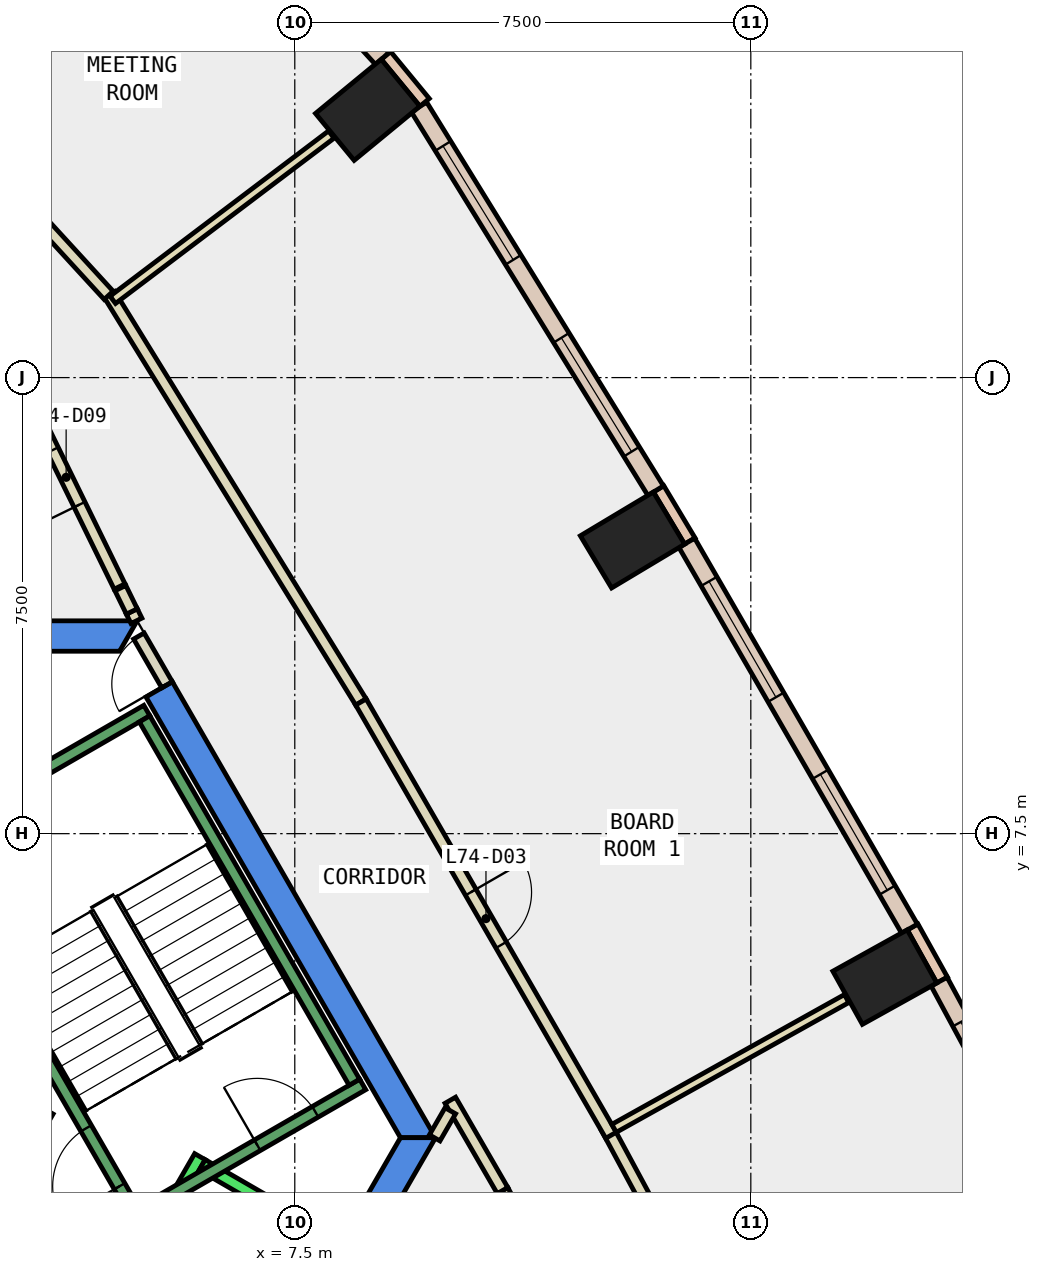
"""IFC4 building model, lengths in metres.
Left out: names, types, materials, properties, quantities, classifications, styles, units other than length and angle.
Written with IfcOpenShell. Run it as: python <this file> out.ifc"""

import sys

from ifc_helpers import new_model, si_unit, direction, frame, frame_2d, origin, origin_2d, place, context, subcontext, project, spatial, polyline, rectangle, outline, extrude, element, fill, save


model = new_model("IFC4")
c1 = context("Model", 3, precision=1e-05, world=origin(), true_north=direction((0.0, 1.0)))
c2 = subcontext(c1, "Body", "Model", "MODEL_VIEW")
j1 = project(units=[si_unit("LENGTHUNIT", "METRE"), si_unit("PLANEANGLEUNIT", "RADIAN")], contexts=[c1])
p1 = place(None, origin())
s1 = spatial("IfcSite", under=j1, at=p1, CompositionType="ELEMENT")
p2 = place(p1, origin())
s2 = spatial("IfcBuilding", under=s1, at=p2, CompositionType="ELEMENT")
p3 = place(p2, frame((0.0, 0.0, 315.2)))
s3 = spatial("IfcBuildingStorey", under=s2, at=p3, CompositionType="ELEMENT", Elevation=315.2)
for number, where, z_axis, x_axis in (
    (1, (17.204, 5.141, -0.34), (0.0, 0.0, 1.0), (-0.486, 0.874, 0.0)),
    (2, (13.054, 12.329, -0.34), (0.0, 0.0, 1.0), (-0.514, 0.858, 0.0)),
    (3, (8.699, 19.403, -0.34), (0.0, 0.0, 1.0), (-0.636, 0.772, 0.0)),
):
    element("IfcColumn", number, at=place(p3, frame(where, z_axis=z_axis, x_axis=x_axis)), inside=s3, PredefinedType="COLUMN", context=c2, shape_type="SweptSolid", body=[
        extrude(rectangle(XDim=1.0, YDim=1.4, at=origin_2d()), origin(), (0.0, 0.0, 1.0), 3.6),
    ])
p4 = place(p3, frame((0.0, 0.0, -0.34)))
e4 = element("IfcWall", 4, at=p4, inside=s3, PredefinedType="SHEAR", context=c2, shape_type="SweptSolid", body=[
    extrude(outline(polyline([(5.486, 9.998), (5.053, 9.748), (9.238, 2.5), (9.815, 2.5), (5.486, 9.998)])), origin(), (0.0, 0.0, 1.0), 3.6),
])
p5 = place(p3, frame((0.0, 0.0, -0.34)))
e5 = element("IfcWall", 5, at=p5, inside=s3, PredefinedType="SHEAR", context=c2, shape_type="SweptSolid", body=[
    extrude(outline(polyline([(4.907, 11.0), (-4.907, 11.0), (-4.619, 10.5), (4.619, 10.5), (4.907, 11.0)])), origin(), (0.0, 0.0, 1.0), 3.6),
])
p6 = place(p3, frame((0.0, 0.0, -0.34)))
e6 = element("IfcWall", 6, at=p6, inside=s3, PredefinedType="SHEAR", context=c2, shape_type="SweptSolid", body=[
    extrude(outline(polyline([(4.907, -6.0), (9.815, 2.5), (9.238, 2.5), (4.619, -5.5), (4.907, -6.0)])), origin(), (0.0, 0.0, 1.0), 3.6),
])
p7 = place(p3, frame((18.147, 5.092, 0.0), z_axis=(0.0, 0.0, 1.0), x_axis=(-0.486036693078, 0.873938403425, 0.0)))
e7 = element("IfcWall", 7, at=p7, inside=s3, PredefinedType="STANDARD", context=c2, shape_type="SweptSolid", body=[
    extrude(rectangle(XDim=1.0, YDim=0.2, at=frame_2d((0.5, 0.0))), origin(), (0.0, 0.0, 1.0), 3.26),
])
p8 = place(p3, frame((13.997, 12.312, 0.0), z_axis=(0.0, 0.0, 1.0), x_axis=(-0.514064933905, 0.857751271482, 0.0)))
e8 = element("IfcWall", 8, at=p8, inside=s3, PredefinedType="STANDARD", context=c2, shape_type="SweptSolid", body=[
    extrude(rectangle(XDim=1.0, YDim=0.2, at=frame_2d((0.5, 0.0))), origin(), (0.0, 0.0, 1.0), 3.26),
])
p9 = place(p3, frame((9.635, 19.525, 0.0), z_axis=(0.0, 0.0, 1.0), x_axis=(-0.6357329148, 0.77190910154, 0.0)))
e9 = element("IfcWall", 9, at=p9, inside=s3, PredefinedType="STANDARD", context=c2, shape_type="SweptSolid", body=[
    extrude(rectangle(XDim=1.0, YDim=0.2, at=frame_2d((0.5, 0.0))), origin(), (0.0, 0.0, 1.0), 3.26),
])
p10 = place(p3, frame((21.615, -1.462, 0.0), z_axis=(0.0, 0.0, 1.0), x_axis=(-0.474421773145, 0.880297666228, 0.0)))
e10 = element("IfcWall", 10, at=p10, inside=s3, PredefinedType="STANDARD", context=c2, shape_type="SweptSolid", body=[
    extrude(rectangle(XDim=7.416, YDim=0.3, at=frame_2d((3.708, 0.0))), origin(), (0.0, 0.0, 1.0), 3.26),
])
p11 = place(p10, frame((0.754, 0.0, 0.9)))
e11 = element("IfcOpeningElement", 11, at=p11, cuts=e10, PredefinedType="OPENING", context=c2, shape_type="SweptSolid", body=[
    extrude(rectangle(XDim=2.2, YDim=2.0, at=frame_2d((1.1, 1.0))), frame((0.0, 0.16, 0.0), z_axis=(0.0, -1.0, 0.0), x_axis=(1.0, 0.0, 0.0)), (0.0, 0.0, 1.0), 0.32),
])
p12 = place(p10, frame((4.462, 0.0, 0.9)))
e12 = element("IfcOpeningElement", 12, at=p12, cuts=e10, PredefinedType="OPENING", context=c2, shape_type="SweptSolid", body=[
    extrude(rectangle(XDim=2.2, YDim=2.0, at=frame_2d((1.1, 1.0))), frame((0.0, 0.16, 0.0), z_axis=(0.0, -1.0, 0.0), x_axis=(1.0, 0.0, 0.0)), (0.0, 0.0, 1.0), 0.32),
])
p13 = place(p3, frame((17.61, 5.937, 0.0), z_axis=(0.0, 0.0, 1.0), x_axis=(-0.499923391538, 0.866069629183, 0.0)))
e13 = element("IfcWall", 13, at=p13, inside=s3, PredefinedType="STANDARD", context=c2, shape_type="SweptSolid", body=[
    extrude(rectangle(XDim=7.327, YDim=0.3, at=frame_2d((3.664, 0.0))), origin(), (0.0, 0.0, 1.0), 3.26),
])
p14 = place(p13, frame((0.732, 0.0, 0.9)))
e14 = element("IfcOpeningElement", 14, at=p14, cuts=e13, PredefinedType="OPENING", context=c2, shape_type="SweptSolid", body=[
    extrude(rectangle(XDim=2.2, YDim=2.0, at=frame_2d((1.1, 1.0))), frame((0.0, 0.16, 0.0), z_axis=(0.0, -1.0, 0.0), x_axis=(1.0, 0.0, 0.0)), (0.0, 0.0, 1.0), 0.32),
])
p15 = place(p13, frame((4.395, 0.0, 0.9)))
e15 = element("IfcOpeningElement", 15, at=p15, cuts=e13, PredefinedType="OPENING", context=c2, shape_type="SweptSolid", body=[
    extrude(rectangle(XDim=2.2, YDim=2.0, at=frame_2d((1.1, 1.0))), frame((0.0, 0.16, 0.0), z_axis=(0.0, -1.0, 0.0), x_axis=(1.0, 0.0, 0.0)), (0.0, 0.0, 1.0), 0.32),
])
p16 = place(p3, frame((13.435, 13.14, 0.0), z_axis=(0.0, 0.0, 1.0), x_axis=(-0.525070792614, 0.851058554239, 0.0)))
e16 = element("IfcWall", 16, at=p16, inside=s3, PredefinedType="STANDARD", context=c2, shape_type="SweptSolid", body=[
    extrude(rectangle(XDim=7.414, YDim=0.3, at=frame_2d((3.707, 0.0))), origin(), (0.0, 0.0, 1.0), 3.26),
])
p17 = place(p16, frame((0.754, 0.0, 0.9)))
e17 = element("IfcOpeningElement", 17, at=p17, cuts=e16, PredefinedType="OPENING", context=c2, shape_type="SweptSolid", body=[
    extrude(rectangle(XDim=2.2, YDim=2.0, at=frame_2d((1.1, 1.0))), frame((0.0, 0.16, 0.0), z_axis=(0.0, -1.0, 0.0), x_axis=(1.0, 0.0, 0.0)), (0.0, 0.0, 1.0), 0.32),
])
p18 = place(p16, frame((4.461, 0.0, 0.9)))
e18 = element("IfcOpeningElement", 18, at=p18, cuts=e16, PredefinedType="OPENING", context=c2, shape_type="SweptSolid", body=[
    extrude(rectangle(XDim=2.2, YDim=2.0, at=frame_2d((1.1, 1.0))), frame((0.0, 0.16, 0.0), z_axis=(0.0, -1.0, 0.0), x_axis=(1.0, 0.0, 0.0)), (0.0, 0.0, 1.0), 0.32),
])
p19 = place(p3, frame((8.94, 20.248, 0.0), z_axis=(0.0, 0.0, 1.0), x_axis=(-0.675798306171, 0.737086595575, 0.0)))
e19 = element("IfcWall", 19, at=p19, inside=s3, PredefinedType="STANDARD", context=c2, shape_type="SweptSolid", body=[
    extrude(rectangle(XDim=4.501, YDim=0.3, at=frame_2d((2.25, 0.0))), origin(), (0.0, 0.0, 1.0), 3.26),
])
p20 = place(p19, frame((1.551, 0.0, 0.9)))
e20 = element("IfcOpeningElement", 20, at=p20, cuts=e19, PredefinedType="OPENING", context=c2, shape_type="SweptSolid", body=[
    extrude(rectangle(XDim=1.4, YDim=2.0, at=frame_2d((0.7, 1.0))), frame((0.0, 0.16, 0.0), z_axis=(0.0, -1.0, 0.0), x_axis=(1.0, 0.0, 0.0)), (0.0, 0.0, 1.0), 0.32),
])
p21 = place(p3, frame((4.896, 11.0, 0.0), z_axis=(0.0, 0.0, 1.0), x_axis=(-0.44208884847, 0.896971264901, 0.0)))
e21 = element("IfcWall", 21, at=p21, inside=s3, PredefinedType="PARTITIONING", context=c2, shape_type="SweptSolid", body=[
    extrude(rectangle(XDim=0.172, YDim=0.2, at=frame_2d((0.086, 0.0))), origin(), (0.0, 0.0, 1.0), 2.4),
])
p22 = place(p3, frame((4.619, 11.564, 0.0), z_axis=(0.0, 0.0, 1.0), x_axis=(-0.439654479941, 0.898166987964, 0.0)))
e22 = element("IfcWall", 22, at=p22, inside=s3, PredefinedType="PARTITIONING", context=c2, shape_type="SweptSolid", body=[
    extrude(rectangle(XDim=4.0, YDim=0.2, at=frame_2d((2.0, 0.0))), origin(), (0.0, 0.0, 1.0), 3.26),
])
p23 = place(p22, frame((1.5, 0.0, 0.0)))
e23 = element("IfcOpeningElement", 23, at=p23, cuts=e22, PredefinedType="OPENING", context=c2, shape_type="SweptSolid", body=[
    extrude(rectangle(XDim=1.0, YDim=2.1, at=frame_2d((0.5, 1.05))), frame((0.0, 0.11, 0.0), z_axis=(0.0, -1.0, 0.0), x_axis=(1.0, 0.0, 0.0)), (0.0, 0.0, 1.0), 0.22),
])
p24 = place(p3, frame((14.549, -5.107, 0.0), z_axis=(0.0, 0.0, 1.0), x_axis=(-0.47449538478, 0.880257990491, 0.0)))
e24 = element("IfcWall", 24, at=p24, inside=s3, PredefinedType="PARTITIONING", context=c2, shape_type="SweptSolid", body=[
    extrude(rectangle(XDim=7.655, YDim=0.2, at=frame_2d((3.827, 0.0))), origin(), (0.0, 0.0, 1.0), 3.26),
])
p25 = place(p24, frame((2.927, 0.0, 0.0)))
e25 = element("IfcOpeningElement", 25, at=p25, cuts=e24, PredefinedType="OPENING", context=c2, shape_type="SweptSolid", body=[
    extrude(rectangle(XDim=1.8, YDim=2.1, at=frame_2d((0.9, 1.05))), frame((0.0, 0.11, 0.0), z_axis=(0.0, -1.0, 0.0), x_axis=(1.0, 0.0, 0.0)), (0.0, 0.0, 1.0), 0.22),
])
p26 = place(p3, frame((10.917, 1.631, 0.0), z_axis=(0.0, 0.0, 1.0), x_axis=(-0.500699613169, 0.865621104972, 0.0)))
e26 = element("IfcWall", 26, at=p26, inside=s3, PredefinedType="PARTITIONING", context=c2, shape_type="SweptSolid", body=[
    extrude(rectangle(XDim=1.715, YDim=0.2, at=frame_2d((0.858, 0.0))), origin(), (0.0, 0.0, 1.0), 3.26),
])
p27 = place(p3, frame((10.058, 2.943, 0.0), z_axis=(0.0, 0.0, 1.0), x_axis=(-0.499352927503, -0.866398669086, 0.0)))
e27 = element("IfcWall", 27, at=p27, inside=s3, PredefinedType="PARTITIONING", context=c2, shape_type="SweptSolid", body=[
    extrude(rectangle(XDim=0.515, YDim=0.2, at=frame_2d((0.257, 0.0))), origin(), (0.0, 0.0, 1.0), 3.26),
])
p28 = place(p3, frame((12.628, 2.671, 0.0), z_axis=(0.0, 0.0, 1.0), x_axis=(0.474489967676, -0.880260910512, 0.0)))
e28 = element("IfcWall", 28, at=p28, inside=s3, PredefinedType="PARTITIONING", context=c2, shape_type="SweptSolid", body=[
    extrude(rectangle(XDim=7.948, YDim=0.2, at=frame_2d((3.974, 0.0))), origin(), (0.0, 0.0, 1.0), 3.26),
])
p29 = place(p28, frame((3.474, 0.0, 0.0)))
e29 = element("IfcOpeningElement", 29, at=p29, cuts=e28, PredefinedType="OPENING", context=c2, shape_type="SweptSolid", body=[
    extrude(rectangle(XDim=1.0, YDim=2.1, at=frame_2d((0.5, 1.05))), frame((0.0, 0.11, 0.0), z_axis=(0.0, -1.0, 0.0), x_axis=(1.0, 0.0, 0.0)), (0.0, 0.0, 1.0), 0.22),
])
p30 = place(p3, frame((4.454, 16.364, 0.0), z_axis=(0.0, 0.0, 1.0), x_axis=(0.525142215688, -0.851014484778, 0.0)))
e30 = element("IfcWall", 30, at=p30, inside=s3, PredefinedType="PARTITIONING", context=c2, shape_type="SweptSolid", body=[
    extrude(rectangle(XDim=7.872, YDim=0.2, at=frame_2d((3.936, 0.0))), origin(), (0.0, 0.0, 1.0), 3.26),
])
p31 = place(p3, frame((8.588, 9.665, 0.0), z_axis=(0.0, 0.0, 1.0), x_axis=(0.499946799636, -0.86605611685, 0.0)))
e31 = element("IfcWall", 31, at=p31, inside=s3, PredefinedType="PARTITIONING", context=c2, shape_type="SweptSolid", body=[
    extrude(rectangle(XDim=8.227, YDim=0.2, at=frame_2d((4.114, 0.0))), origin(), (0.0, 0.0, 1.0), 3.26),
])
p32 = place(p31, frame((3.613, 0.0, 0.0)))
e32 = element("IfcOpeningElement", 32, at=p32, cuts=e31, PredefinedType="OPENING", context=c2, shape_type="SweptSolid", body=[
    extrude(rectangle(XDim=1.0, YDim=2.1, at=frame_2d((0.5, 1.05))), frame((0.0, 0.11, 0.0), z_axis=(0.0, -1.0, 0.0), x_axis=(1.0, 0.0, 0.0)), (0.0, 0.0, 1.0), 0.22),
])
p33 = place(p3, frame((2.204, 18.791, 0.0), z_axis=(0.0, 0.0, 1.0), x_axis=(0.675731313907, -0.737148011871, 0.0)))
e33 = element("IfcWall", 33, at=p33, inside=s3, PredefinedType="PARTITIONING", context=c2, shape_type="SweptSolid", body=[
    extrude(rectangle(XDim=3.307, YDim=0.2, at=frame_2d((1.654, 0.0))), origin(), (0.0, 0.0, 1.0), 3.26),
])
p34 = place(p3, frame((1.866, 3.732, 0.0), z_axis=(0.0, 0.0, 1.0), x_axis=(0.866043361281, -0.499968895414, 0.0)))
e34 = element("IfcWall", 34, at=p34, inside=s3, PredefinedType="PARTITIONING", context=c2, shape_type="SweptSolid", body=[
    extrude(rectangle(XDim=1.858, YDim=0.2, at=frame_2d((0.929, 0.0))), origin(), (0.0, 0.0, 1.0), 3.26),
])
p35 = place(p34, frame((0.379, 0.0, 0.0)))
e35 = element("IfcOpeningElement", 35, at=p35, cuts=e34, PredefinedType="OPENING", context=c2, shape_type="SweptSolid", body=[
    extrude(rectangle(XDim=1.0, YDim=2.1, at=frame_2d((0.5, 1.05))), frame((0.0, 0.11, 0.0), z_axis=(0.0, -1.0, 0.0), x_axis=(1.0, 0.0, 0.0)), (0.0, 0.0, 1.0), 0.22),
])
p36 = place(p3, frame((12.751, 2.654, 0.0), z_axis=(0.0, 0.0, 1.0), x_axis=(0.873277679945, 0.487222837837, 0.0)))
e36 = element("IfcWall", 36, at=p36, inside=s3, PredefinedType="PARTITIONING", context=c2, shape_type="SweptSolid", body=[
    extrude(rectangle(XDim=4.38, YDim=0.15, at=frame_2d((2.19, 0.0))), origin(), (0.0, 0.0, 1.0), 3.26),
])
p37 = place(p3, frame((4.507, 16.279, 0.0), z_axis=(0.0, 0.0, 1.0), x_axis=(0.797594482062, 0.603194033611, 0.0)))
e37 = element("IfcWall", 37, at=p37, inside=s3, PredefinedType="PARTITIONING", context=c2, shape_type="SweptSolid", body=[
    extrude(rectangle(XDim=4.506, YDim=0.15, at=frame_2d((2.253, 0.0))), origin(), (0.0, 0.0, 1.0), 3.26),
])
p38 = place(p3, frame((5.399, 9.948, 0.0), z_axis=(0.0, 0.0, 1.0), x_axis=(-0.499882215713, 0.866093395895, 0.0)))
e38 = element("IfcWall", 38, at=p38, inside=s3, PredefinedType="PARTITIONING", context=c2, shape_type="SweptSolid", body=[
    extrude(rectangle(XDim=0.926, YDim=0.2, at=frame_2d((0.463, 0.0))), origin(), (0.0, 0.0, 1.0), 2.4),
])
p39 = place(p38, frame((0.017, 0.0, 0.0)))
e39 = element("IfcOpeningElement", 39, at=p39, cuts=e38, PredefinedType="OPENING", context=c2, shape_type="SweptSolid", body=[
    extrude(rectangle(XDim=0.9, YDim=2.1, at=frame_2d((0.45, 1.05))), frame((0.0, 0.11, 0.0), z_axis=(0.0, -1.0, 0.0), x_axis=(1.0, 0.0, 0.0)), (0.0, 0.0, 1.0), 0.22),
])
p40 = place(p3, frame((4.82, 11.154, 0.0), z_axis=(0.0, 0.0, 1.0), x_axis=(-0.439660677009, 0.898163954461, 0.0)))
e40 = element("IfcWall", 40, at=p40, inside=s3, PredefinedType="PARTITIONING", context=c2, shape_type="SweptSolid", body=[
    extrude(rectangle(XDim=0.427, YDim=0.2, at=frame_2d((0.214, 0.0))), origin(), (0.0, 0.0, 1.0), 3.26),
])
p41 = place(p3, frame((3.24, -2.488, 0.0), z_axis=(0.0, 0.0, 1.0), x_axis=(0.500034260056, 0.866005622828, 0.0)))
e41 = element("IfcWall", 41, at=p41, inside=s3, PredefinedType="STANDARD", context=c2, shape_type="SweptSolid", body=[
    extrude(rectangle(XDim=5.399, YDim=0.2, at=frame_2d((2.7, 0.0))), origin(), (0.0, 0.0, 1.0), 3.26),
])
p42 = place(p41, frame((3.225, 0.0, 0.0)))
e42 = element("IfcOpeningElement", 42, at=p42, cuts=e41, PredefinedType="OPENING", context=c2, shape_type="SweptSolid", body=[
    extrude(rectangle(XDim=1.1, YDim=2.1, at=frame_2d((0.55, 1.05))), frame((0.0, 0.11, 0.0), z_axis=(0.0, -1.0, 0.0), x_axis=(1.0, 0.0, 0.0)), (0.0, 0.0, 1.0), 0.22),
])
p43 = place(p41, frame((1.225, 0.0, 0.0)))
e43 = element("IfcOpeningElement", 43, at=p43, cuts=e41, PredefinedType="OPENING", context=c2, shape_type="SweptSolid", body=[
    extrude(rectangle(XDim=1.1, YDim=2.1, at=frame_2d((0.55, 1.05))), frame((0.0, 0.11, 0.0), z_axis=(0.0, -1.0, 0.0), x_axis=(1.0, 0.0, 0.0)), (0.0, 0.0, 1.0), 0.22),
])
p44 = place(p3, frame((5.977, 2.052, 0.0), z_axis=(0.0, 0.0, 1.0), x_axis=(0.865973769406, -0.500089422704, 0.0)))
e44 = element("IfcWall", 44, at=p44, inside=s3, PredefinedType="STANDARD", context=c2, shape_type="SweptSolid", body=[
    extrude(rectangle(XDim=2.399, YDim=0.2, at=frame_2d((1.2, 0.0))), origin(), (0.0, 0.0, 1.0), 3.26),
])
p45 = place(p3, frame((4.806, 1.176, 0.0), z_axis=(0.0, 0.0, 1.0), x_axis=(0.866059941101, 0.499940174841, 0.0)))
e45 = element("IfcWall", 45, at=p45, inside=s3, PredefinedType="STANDARD", context=c2, shape_type="SweptSolid", body=[
    extrude(rectangle(XDim=4.4, YDim=0.2, at=frame_2d((2.2, 0.0))), origin(), (0.0, 0.0, 1.0), 3.26),
])
p46 = place(p45, frame((2.4, 0.0, 0.0)))
e46 = element("IfcOpeningElement", 46, at=p46, cuts=e45, PredefinedType="OPENING", context=c2, shape_type="SweptSolid", body=[
    extrude(rectangle(XDim=1.1, YDim=2.2, at=frame_2d((0.55, 1.1))), frame((0.0, 0.11, 0.0), z_axis=(0.0, -1.0, 0.0), x_axis=(1.0, 0.0, 0.0)), (0.0, 0.0, 1.0), 0.22),
])
p47 = place(p3, frame((2.7, 8.158, 0.0), z_axis=(0.0, 0.0, 1.0), x_axis=(0.86611865017, 0.499838457731, 0.0)))
e47 = element("IfcWall", 47, at=p47, inside=s3, PredefinedType="STANDARD", context=c2, shape_type="SweptSolid", body=[
    extrude(rectangle(XDim=2.733, YDim=0.2, at=frame_2d((1.366, 0.0))), origin(), (0.0, 0.0, 1.0), 3.26),
])
p48 = place(p3, frame((4.843, 1.312, 0.0), z_axis=(0.0, 0.0, 1.0), x_axis=(-0.499963383562, 0.866046543262, 0.0)))
e48 = element("IfcWall", 48, at=p48, inside=s3, PredefinedType="STANDARD", context=c2, shape_type="SweptSolid", body=[
    extrude(rectangle(XDim=6.9, YDim=0.2, at=frame_2d((3.45, 0.0))), origin(), (0.0, 0.0, 1.0), 3.26),
])
p49 = place(p48, frame((0.45, 0.0, 0.0)))
e49 = element("IfcOpeningElement", 49, at=p49, cuts=e48, PredefinedType="OPENING", context=c2, shape_type="SweptSolid", body=[
    extrude(rectangle(XDim=1.1, YDim=2.2, at=frame_2d((0.55, 1.1))), frame((0.0, 0.11, 0.0), z_axis=(0.0, -1.0, 0.0), x_axis=(1.0, 0.0, 0.0)), (0.0, 0.0, 1.0), 0.22),
])
p50 = place(p3, frame((8.48, 3.412, 0.0), z_axis=(0.0, 0.0, 1.0), x_axis=(-0.499978703459, 0.866037698999, 0.0)))
e50 = element("IfcWall", 50, at=p50, inside=s3, PredefinedType="STANDARD", context=c2, shape_type="SweptSolid", body=[
    extrude(rectangle(XDim=6.9, YDim=0.2, at=frame_2d((3.45, 0.0))), origin(), (0.0, 0.0, 1.0), 3.26),
])
p51 = place(p12, origin())
e51 = element("IfcWindow", 51, at=p51, inside=s3, PartitioningType="SINGLE_PANEL", PredefinedType="WINDOW", context=c2, shape_type="SweptSolid", body=[
    extrude(rectangle(XDim=2.2, YDim=2.0, at=frame_2d((1.1, 1.0))), frame((0.0, 0.03, 0.0), z_axis=(0.0, -1.0, 0.0), x_axis=(1.0, 0.0, 0.0)), (0.0, 0.0, 1.0), 0.06),
])
fill(e12, e51)
p52 = place(p14, origin())
e52 = element("IfcWindow", 52, at=p52, inside=s3, PartitioningType="SINGLE_PANEL", PredefinedType="WINDOW", context=c2, shape_type="SweptSolid", body=[
    extrude(rectangle(XDim=2.2, YDim=2.0, at=frame_2d((1.1, 1.0))), frame((0.0, 0.03, 0.0), z_axis=(0.0, -1.0, 0.0), x_axis=(1.0, 0.0, 0.0)), (0.0, 0.0, 1.0), 0.06),
])
fill(e14, e52)
p53 = place(p15, origin())
e53 = element("IfcWindow", 53, at=p53, inside=s3, PartitioningType="SINGLE_PANEL", PredefinedType="WINDOW", context=c2, shape_type="SweptSolid", body=[
    extrude(rectangle(XDim=2.2, YDim=2.0, at=frame_2d((1.1, 1.0))), frame((0.0, 0.03, 0.0), z_axis=(0.0, -1.0, 0.0), x_axis=(1.0, 0.0, 0.0)), (0.0, 0.0, 1.0), 0.06),
])
fill(e15, e53)
p54 = place(p17, origin())
e54 = element("IfcWindow", 54, at=p54, inside=s3, PartitioningType="SINGLE_PANEL", PredefinedType="WINDOW", context=c2, shape_type="SweptSolid", body=[
    extrude(rectangle(XDim=2.2, YDim=2.0, at=frame_2d((1.1, 1.0))), frame((0.0, 0.03, 0.0), z_axis=(0.0, -1.0, 0.0), x_axis=(1.0, 0.0, 0.0)), (0.0, 0.0, 1.0), 0.06),
])
fill(e17, e54)
p55 = place(p18, origin())
e55 = element("IfcWindow", 55, at=p55, inside=s3, PartitioningType="SINGLE_PANEL", PredefinedType="WINDOW", context=c2, shape_type="SweptSolid", body=[
    extrude(rectangle(XDim=2.2, YDim=2.0, at=frame_2d((1.1, 1.0))), frame((0.0, 0.03, 0.0), z_axis=(0.0, -1.0, 0.0), x_axis=(1.0, 0.0, 0.0)), (0.0, 0.0, 1.0), 0.06),
])
fill(e18, e55)
p56 = place(p32, origin())
e56 = element("IfcDoor", 56, at=p56, inside=s3, OperationType="SINGLE_SWING_RIGHT", PredefinedType="DOOR", context=c2, shape_type="SweptSolid", body=[
    extrude(rectangle(XDim=1.0, YDim=2.1, at=frame_2d((0.5, 1.05))), frame((0.0, 0.025, 0.0), z_axis=(0.0, -1.0, 0.0), x_axis=(1.0, 0.0, 0.0)), (0.0, 0.0, 1.0), 0.05),
])
fill(e32, e56)
p57 = place(p23, origin())
e57 = element("IfcDoor", 57, at=p57, inside=s3, OperationType="SINGLE_SWING_LEFT", PredefinedType="DOOR", context=c2, shape_type="SweptSolid", body=[
    extrude(rectangle(XDim=1.0, YDim=2.1, at=frame_2d((0.5, 1.05))), frame((0.0, 0.025, 0.0), z_axis=(0.0, -1.0, 0.0), x_axis=(1.0, 0.0, 0.0)), (0.0, 0.0, 1.0), 0.05),
])
fill(e23, e57)
p58 = place(p39, origin())
e58 = element("IfcDoor", 58, at=p58, inside=s3, OperationType="SINGLE_SWING_LEFT", PredefinedType="DOOR", context=c2, shape_type="SweptSolid", body=[
    extrude(rectangle(XDim=0.9, YDim=2.1, at=frame_2d((0.45, 1.05))), frame((0.0, 0.025, 0.0), z_axis=(0.0, -1.0, 0.0), x_axis=(1.0, 0.0, 0.0)), (0.0, 0.0, 1.0), 0.05),
])
fill(e39, e58)
p59 = place(p49, origin())
e59 = element("IfcDoor", 59, at=p59, inside=s3, OperationType="SINGLE_SWING_LEFT", PredefinedType="DOOR", context=c2, shape_type="SweptSolid", body=[
    extrude(rectangle(XDim=1.1, YDim=2.2, at=frame_2d((0.55, 1.1))), frame((0.0, 0.025, 0.0), z_axis=(0.0, -1.0, 0.0), x_axis=(1.0, 0.0, 0.0)), (0.0, 0.0, 1.0), 0.05),
])
fill(e49, e59)
p60 = place(p46, origin())
e60 = element("IfcDoor", 60, at=p60, inside=s3, OperationType="SINGLE_SWING_LEFT", PredefinedType="DOOR", context=c2, shape_type="SweptSolid", body=[
    extrude(rectangle(XDim=1.1, YDim=2.2, at=frame_2d((0.55, 1.1))), frame((0.0, 0.025, 0.0), z_axis=(0.0, -1.0, 0.0), x_axis=(1.0, 0.0, 0.0)), (0.0, 0.0, 1.0), 0.05),
])
fill(e46, e60)
save(model, sys.argv[1])
